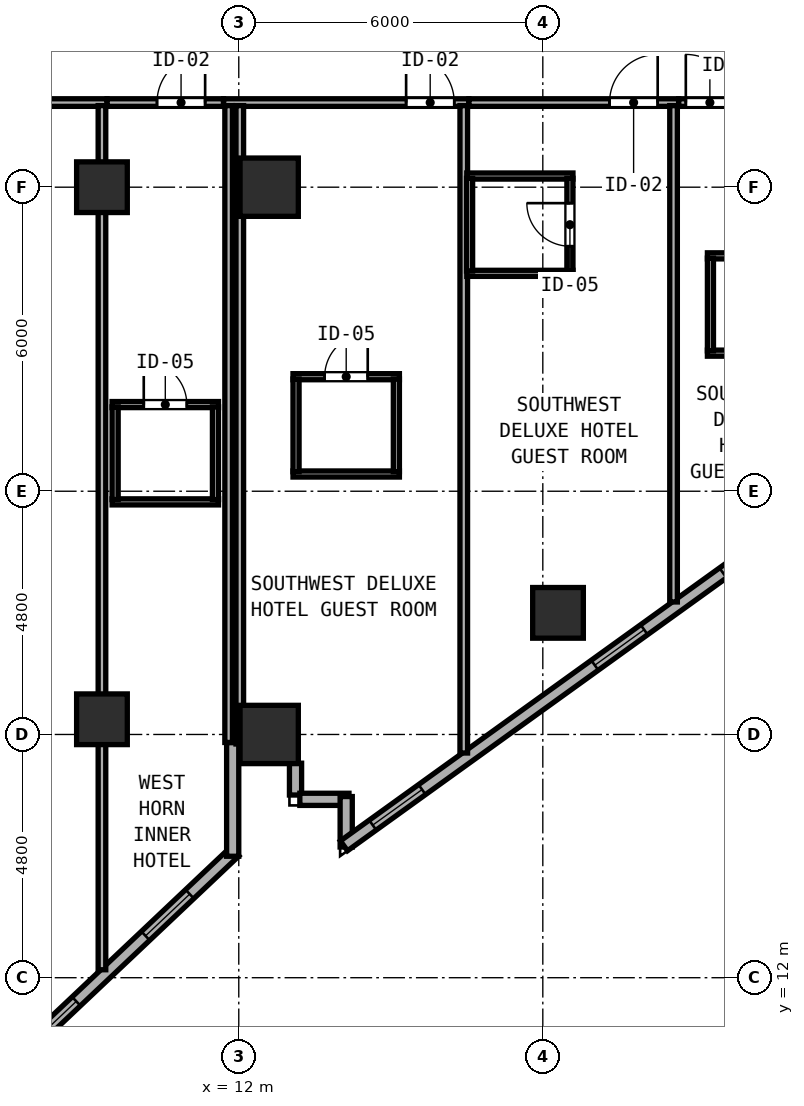
"""IFC4 building model, lengths in metres.
Left out: names, types, materials, properties, quantities, classifications, styles, units other than length and angle.
Written with IfcOpenShell. Run it as: python <this file> out.ifc"""

import sys

from ifc_helpers import new_model, si_unit, direction, frame, frame_2d, origin, origin_2d, place, context, subcontext, project, spatial, rectangle, hollow_rectangle, extrude, element, fill, save


model = new_model("IFC4")
c1 = context("Model", 3, precision=1e-05, world=origin(), true_north=direction((0.0, 1.0)))
c2 = subcontext(c1, "Body", "Model", "MODEL_VIEW")
j1 = project(units=[si_unit("LENGTHUNIT", "METRE"), si_unit("PLANEANGLEUNIT", "RADIAN")], contexts=[c1])
p1 = place(None, origin())
s1 = spatial("IfcSite", under=j1, at=p1, CompositionType="ELEMENT")
p2 = place(p1, origin())
s2 = spatial("IfcBuilding", under=s1, at=p2, CompositionType="ELEMENT")
p3 = place(p2, frame((0.0, 0.0, 59.0)))
s3 = spatial("IfcBuildingStorey", under=s2, at=p3, CompositionType="ELEMENT", Elevation=59.0)
for number, where, z_axis, x_axis in (
    (1, (12.6, 16.8, 0.0), (0.0, 0.0, 1.0), (1.0, 0.0, 0.0)),
    (2, (12.6, 27.6, 0.0), (0.0, 0.0, 1.0), (1.0, 0.0, 0.0)),
):
    element("IfcColumn", number, at=place(p3, frame(where, z_axis=z_axis, x_axis=x_axis)), inside=s3, PredefinedType="COLUMN", context=c2, shape_type="SweptSolid", body=[
        extrude(hollow_rectangle(XDim=1.15, YDim=1.15, WallThickness=0.042, at=origin_2d()), origin(), (0.0, 0.0, 1.0), 3.8),
    ])
for number, where, z_axis, x_axis in (
    (3, (18.3, 19.2, 0.0), (0.0, 0.0, 1.0), (1.0, 0.0, 0.0)),
    (4, (9.3, 17.1, 0.0), (0.0, 0.0, 1.0), (1.0, 0.0, 0.0)),
    (5, (9.3, 27.6, 0.0), (0.0, 0.0, 1.0), (1.0, 0.0, 0.0)),
):
    element("IfcColumn", number, at=place(p3, frame(where, z_axis=z_axis, x_axis=x_axis)), inside=s3, PredefinedType="COLUMN", context=c2, shape_type="SweptSolid", body=[
        extrude(hollow_rectangle(XDim=1.0, YDim=1.0, WallThickness=0.038, at=origin_2d()), origin(), (0.0, 0.0, 1.0), 3.8),
    ])
p4 = place(p3, frame((3.489, 6.518, 0.0), z_axis=(0.0, 0.0, 1.0), x_axis=(0.726640160789, 0.687018250652, 0.0)))
e6 = element("IfcWall", 6, at=p4, inside=s3, PredefinedType="SOLIDWALL", context=c2, shape_type="SweptSolid", body=[
    extrude(rectangle(XDim=11.603, YDim=0.24, at=frame_2d((5.801, 0.0))), origin(), (0.0, 0.0, 1.0), 3.6),
])
p5 = place(p4, frame((0.7, 0.0, 0.85)))
e7 = element("IfcOpeningElement", 7, at=p5, cuts=e6, PredefinedType="OPENING", context=c2, shape_type="SweptSolid", body=[
    extrude(rectangle(XDim=1.2, YDim=1.85, at=frame_2d((0.6, 0.925))), frame((0.0, 0.13, 0.0), z_axis=(0.0, -1.0, 0.0), x_axis=(1.0, 0.0, 0.0)), (0.0, 0.0, 1.0), 0.26),
])
p6 = place(p4, frame((6.1, 0.0, 0.85)))
e8 = element("IfcOpeningElement", 8, at=p6, cuts=e6, PredefinedType="OPENING", context=c2, shape_type="SweptSolid", body=[
    extrude(rectangle(XDim=1.2, YDim=1.85, at=frame_2d((0.6, 0.925))), frame((0.0, 0.13, 0.0), z_axis=(0.0, -1.0, 0.0), x_axis=(1.0, 0.0, 0.0)), (0.0, 0.0, 1.0), 0.26),
])
p7 = place(p4, frame((9.18, 0.0, 0.85)))
e9 = element("IfcOpeningElement", 9, at=p7, cuts=e6, PredefinedType="OPENING", context=c2, shape_type="SweptSolid", body=[
    extrude(rectangle(XDim=1.2, YDim=1.85, at=frame_2d((0.6, 0.925))), frame((0.0, 0.13, 0.0), z_axis=(0.0, -1.0, 0.0), x_axis=(1.0, 0.0, 0.0)), (0.0, 0.0, 1.0), 0.26),
])
p8 = place(p3, frame((11.88, 14.397, 0.0), z_axis=(0.0, 0.0, 1.0), x_axis=(0.0, 1.0, 0.0)))
e10 = element("IfcWall", 10, at=p8, inside=s3, PredefinedType="SOLIDWALL", context=c2, shape_type="SweptSolid", body=[
    extrude(rectangle(XDim=2.243, YDim=0.24, at=frame_2d((1.122, 0.0))), origin(), (0.0, 0.0, 1.0), 3.6),
])
p9 = place(p3, frame((13.12, 16.233, 0.0), z_axis=(0.0, 0.0, 1.0), x_axis=(0.0, -1.0, 0.0)))
e11 = element("IfcWall", 11, at=p9, inside=s3, PredefinedType="SOLIDWALL", context=c2, shape_type="SweptSolid", body=[
    extrude(rectangle(XDim=0.628, YDim=0.24, at=frame_2d((0.314, 0.0))), origin(), (0.0, 0.0, 1.0), 3.6),
])
p10 = place(p3, frame((13.205, 15.52, 0.0), z_axis=(0.0, 0.0, 1.0), x_axis=(1.0, 0.0, 0.0)))
e12 = element("IfcWall", 12, at=p10, inside=s3, PredefinedType="SOLIDWALL", context=c2, shape_type="SweptSolid", body=[
    extrude(rectangle(XDim=0.97, YDim=0.24, at=frame_2d((0.485, 0.0))), origin(), (0.0, 0.0, 1.0), 3.6),
])
p11 = place(p3, frame((14.12, 15.575, 0.0), z_axis=(0.0, 0.0, 1.0), x_axis=(0.0, -1.0, 0.0)))
e13 = element("IfcWall", 13, at=p11, inside=s3, PredefinedType="SOLIDWALL", context=c2, shape_type="SweptSolid", body=[
    extrude(rectangle(XDim=0.996, YDim=0.24, at=frame_2d((0.498, 0.0))), origin(), (0.0, 0.0, 1.0), 3.6),
])
p12 = place(p3, frame((14.075, 14.602, 0.0), z_axis=(0.0, 0.0, 1.0), x_axis=(0.811543176492, 0.58429245476, 0.0)))
e14 = element("IfcWall", 14, at=p12, inside=s3, PredefinedType="SOLIDWALL", context=c2, shape_type="SweptSolid", body=[
    extrude(rectangle(XDim=11.531, YDim=0.24, at=frame_2d((5.765, 0.0))), origin(), (0.0, 0.0, 1.0), 3.097),
])
p13 = place(p12, frame((0.7, 0.0, 0.85)))
e15 = element("IfcOpeningElement", 15, at=p13, cuts=e14, PredefinedType="OPENING", context=c2, shape_type="SweptSolid", body=[
    extrude(rectangle(XDim=1.2, YDim=1.85, at=frame_2d((0.6, 0.925))), frame((0.0, 0.13, 0.0), z_axis=(0.0, -1.0, 0.0), x_axis=(1.0, 0.0, 0.0)), (0.0, 0.0, 1.0), 0.26),
])
p14 = place(p12, frame((6.1, 0.0, 0.85)))
e16 = element("IfcOpeningElement", 16, at=p14, cuts=e14, PredefinedType="OPENING", context=c2, shape_type="SweptSolid", body=[
    extrude(rectangle(XDim=1.2, YDim=1.85, at=frame_2d((0.6, 0.925))), frame((0.0, 0.13, 0.0), z_axis=(0.0, -1.0, 0.0), x_axis=(1.0, 0.0, 0.0)), (0.0, 0.0, 1.0), 0.26),
])
p15 = place(p12, frame((9.218, 0.0, 0.85)))
e17 = element("IfcOpeningElement", 17, at=p15, cuts=e14, PredefinedType="OPENING", context=c2, shape_type="SweptSolid", body=[
    extrude(rectangle(XDim=1.2, YDim=1.85, at=frame_2d((0.6, 0.925))), frame((0.0, 0.13, 0.0), z_axis=(0.0, -1.0, 0.0), x_axis=(1.0, 0.0, 0.0)), (0.0, 0.0, 1.0), 0.26),
])
p16 = place(p3, frame((11.7, 29.27, 0.0), z_axis=(0.0, 0.0, 1.0), x_axis=(1.0, 0.0, 0.0)))
e18 = element("IfcWall", 18, at=p16, inside=s3, PredefinedType="PARTITIONING", context=c2, shape_type="SweptSolid", body=[
    extrude(rectangle(XDim=4.84, YDim=0.15, at=frame_2d((2.42, 0.0))), origin(), (0.0, 0.0, 1.0), 3.6),
])
p17 = place(p16, frame((4.552, 0.0, 0.0), z_axis=(0.0, 0.0, 1.0), x_axis=(-1.0, 0.0, 0.0)))
e19 = element("IfcOpeningElement", 19, at=p17, cuts=e18, PredefinedType="OPENING", context=c2, shape_type="SweptSolid", body=[
    extrude(rectangle(XDim=0.95, YDim=2.15, at=frame_2d((0.475, 1.075))), frame((0.0, 0.085, 0.0), z_axis=(0.0, -1.0, 0.0), x_axis=(1.0, 0.0, 0.0)), (0.0, 0.0, 1.0), 0.17),
])
p18 = place(p3, frame((11.8, 16.642, 0.0), z_axis=(0.0, 0.0, 1.0), x_axis=(0.0, 1.0, 0.0)))
e20 = element("IfcWall", 20, at=p18, inside=s3, PredefinedType="PARTITIONING", context=c2, shape_type="SweptSolid", body=[
    extrude(rectangle(XDim=12.568, YDim=0.15, at=frame_2d((6.284, 0.0))), origin(), (0.0, 0.0, 1.0), 3.6),
])
p19 = place(p3, frame((16.44, 16.434, 0.0), z_axis=(0.0, 0.0, 1.0), x_axis=(0.0, 1.0, 0.0)))
e21 = element("IfcWall", 21, at=p19, inside=s3, PredefinedType="PARTITIONING", context=c2, shape_type="SweptSolid", body=[
    extrude(rectangle(XDim=12.776, YDim=0.15, at=frame_2d((6.388, 0.0))), origin(), (0.0, 0.0, 1.0), 3.6),
])
p20 = place(p3, frame((13.07, 23.86, 0.0), z_axis=(0.0, 0.0, 1.0), x_axis=(1.0, 0.0, 0.0)))
e22 = element("IfcWall", 22, at=p20, inside=s3, PredefinedType="PARTITIONING", context=c2, shape_type="SweptSolid", body=[
    extrude(rectangle(XDim=2.1, YDim=0.12, at=frame_2d((1.05, 0.0))), origin(), (0.0, 0.0, 1.0), 3.6),
])
p21 = place(p20, frame((1.475, 0.0, 0.0), z_axis=(0.0, 0.0, 1.0), x_axis=(-1.0, 0.0, 0.0)))
e23 = element("IfcOpeningElement", 23, at=p21, cuts=e22, PredefinedType="OPENING", context=c2, shape_type="SweptSolid", body=[
    extrude(rectangle(XDim=0.85, YDim=2.1, at=frame_2d((0.425, 1.05))), frame((0.0, 0.07, 0.0), z_axis=(0.0, -1.0, 0.0), x_axis=(1.0, 0.0, 0.0)), (0.0, 0.0, 1.0), 0.14),
])
p22 = place(p3, frame((13.07, 21.94, 0.0), z_axis=(0.0, 0.0, 1.0), x_axis=(1.0, 0.0, 0.0)))
e24 = element("IfcWall", 24, at=p22, inside=s3, PredefinedType="PARTITIONING", context=c2, shape_type="SweptSolid", body=[
    extrude(rectangle(XDim=2.1, YDim=0.12, at=frame_2d((1.05, 0.0))), origin(), (0.0, 0.0, 1.0), 3.6),
])
for number, where, z_axis, x_axis in (
    (25, (13.13, 21.985, 0.0), (0.0, 0.0, 1.0), (0.0, 1.0, 0.0)),
    (26, (15.11, 21.985, 0.0), (0.0, 0.0, 1.0), (0.0, 1.0, 0.0)),
):
    element("IfcWall", number, at=place(p3, frame(where, z_axis=z_axis, x_axis=x_axis)), inside=s3, PredefinedType="PARTITIONING", context=c2, shape_type="SweptSolid", body=[
        extrude(rectangle(XDim=1.83, YDim=0.12, at=frame_2d((0.915, 0.0))), origin(), (0.0, 0.0, 1.0), 3.6),
    ])
p23 = place(p3, frame((16.542, 29.27, 0.0), z_axis=(0.0, 0.0, 1.0), x_axis=(1.0, 0.0, 0.0)))
e27 = element("IfcWall", 27, at=p23, inside=s3, PredefinedType="PARTITIONING", context=c2, shape_type="SweptSolid", body=[
    extrude(rectangle(XDim=4.138, YDim=0.15, at=frame_2d((2.069, 0.0))), origin(), (0.0, 0.0, 1.0), 3.6),
])
p24 = place(p23, frame((3.725, 0.0, 0.0), z_axis=(0.0, 0.0, 1.0), x_axis=(-1.0, 0.0, 0.0)))
e28 = element("IfcOpeningElement", 28, at=p24, cuts=e27, PredefinedType="OPENING", context=c2, shape_type="SweptSolid", body=[
    extrude(rectangle(XDim=0.95, YDim=2.15, at=frame_2d((0.475, 1.075))), frame((0.0, 0.085, 0.0), z_axis=(0.0, -1.0, 0.0), x_axis=(1.0, 0.0, 0.0)), (0.0, 0.0, 1.0), 0.17),
])
p25 = place(p3, frame((20.58, 19.415, 0.0), z_axis=(0.0, 0.0, 1.0), x_axis=(0.0, 1.0, 0.0)))
e29 = element("IfcWall", 29, at=p25, inside=s3, PredefinedType="PARTITIONING", context=c2, shape_type="SweptSolid", body=[
    extrude(rectangle(XDim=9.795, YDim=0.15, at=frame_2d((4.897, 0.0))), origin(), (0.0, 0.0, 1.0), 3.6),
])
p26 = place(p3, frame((16.5, 27.82, 0.0), z_axis=(0.0, 0.0, 1.0), x_axis=(1.0, 0.0, 0.0)))
e30 = element("IfcWall", 30, at=p26, inside=s3, PredefinedType="PARTITIONING", context=c2, shape_type="SweptSolid", body=[
    extrude(rectangle(XDim=2.095, YDim=0.12, at=frame_2d((1.047, 0.0))), origin(), (0.0, 0.0, 1.0), 3.097),
])
p27 = place(p3, frame((16.5, 25.9, 0.0), z_axis=(0.0, 0.0, 1.0), x_axis=(1.0, 0.0, 0.0)))
e31 = element("IfcWall", 31, at=p27, inside=s3, PredefinedType="PARTITIONING", context=c2, shape_type="SweptSolid", body=[
    extrude(rectangle(XDim=2.095, YDim=0.12, at=frame_2d((1.047, 0.0))), origin(), (0.0, 0.0, 1.0), 3.6),
])
p28 = place(p3, frame((16.555, 25.945, 0.0), z_axis=(0.0, 0.0, 1.0), x_axis=(0.0, 1.0, 0.0)))
e32 = element("IfcWall", 32, at=p28, inside=s3, PredefinedType="PARTITIONING", context=c2, shape_type="SweptSolid", body=[
    extrude(rectangle(XDim=1.83, YDim=0.12, at=frame_2d((0.915, 0.0))), origin(), (0.0, 0.0, 1.0), 3.6),
])
p29 = place(p3, frame((18.535, 25.945, 0.0), z_axis=(0.0, 0.0, 1.0), x_axis=(0.0, 1.0, 0.0)))
e33 = element("IfcWall", 33, at=p29, inside=s3, PredefinedType="PARTITIONING", context=c2, shape_type="SweptSolid", body=[
    extrude(rectangle(XDim=1.83, YDim=0.12, at=frame_2d((0.915, 0.0))), origin(), (0.0, 0.0, 1.0), 3.6),
])
p30 = place(p29, frame((0.49, 0.0, 0.0)))
e34 = element("IfcOpeningElement", 34, at=p30, cuts=e33, PredefinedType="OPENING", context=c2, shape_type="SweptSolid", body=[
    extrude(rectangle(XDim=0.85, YDim=2.1, at=frame_2d((0.425, 1.05))), frame((0.0, 0.07, 0.0), z_axis=(0.0, -1.0, 0.0), x_axis=(1.0, 0.0, 0.0)), (0.0, 0.0, 1.0), 0.14),
])
p31 = place(p3, frame((20.682, 29.27, 0.0), z_axis=(0.0, 0.0, 1.0), x_axis=(1.0, 0.0, 0.0)))
e35 = element("IfcWall", 35, at=p31, inside=s3, PredefinedType="PARTITIONING", context=c2, shape_type="SweptSolid", body=[
    extrude(rectangle(XDim=3.236, YDim=0.15, at=frame_2d((1.618, 0.0))), origin(), (0.0, 0.0, 1.0), 3.6),
])
p32 = place(p31, frame((1.09, 0.0, 0.0), z_axis=(0.0, 0.0, 1.0), x_axis=(-1.0, 0.0, 0.0)))
e36 = element("IfcOpeningElement", 36, at=p32, cuts=e35, PredefinedType="OPENING", context=c2, shape_type="SweptSolid", body=[
    extrude(rectangle(XDim=0.95, YDim=2.15, at=frame_2d((0.475, 1.075))), frame((0.0, 0.085, 0.0), z_axis=(0.0, -1.0, 0.0), x_axis=(1.0, 0.0, 0.0)), (0.0, 0.0, 1.0), 0.17),
])
p33 = place(p3, frame((21.248, 26.245, 0.0), z_axis=(0.0, 0.0, 1.0), x_axis=(1.0, 0.0, 0.0)))
e37 = element("IfcWall", 37, at=p33, inside=s3, PredefinedType="PARTITIONING", context=c2, shape_type="SweptSolid", body=[
    extrude(rectangle(XDim=2.1, YDim=0.12, at=frame_2d((1.05, 0.0))), origin(), (0.0, 0.0, 1.0), 3.6),
])
p34 = place(p33, frame((1.475, 0.0, 0.0), z_axis=(0.0, 0.0, 1.0), x_axis=(-1.0, 0.0, 0.0)))
e38 = element("IfcOpeningElement", 38, at=p34, cuts=e37, PredefinedType="OPENING", context=c2, shape_type="SweptSolid", body=[
    extrude(rectangle(XDim=0.85, YDim=2.1, at=frame_2d((0.425, 1.05))), frame((0.0, 0.07, 0.0), z_axis=(0.0, -1.0, 0.0), x_axis=(1.0, 0.0, 0.0)), (0.0, 0.0, 1.0), 0.14),
])
p35 = place(p3, frame((21.248, 24.325, 0.0), z_axis=(0.0, 0.0, 1.0), x_axis=(1.0, 0.0, 0.0)))
e39 = element("IfcWall", 39, at=p35, inside=s3, PredefinedType="PARTITIONING", context=c2, shape_type="SweptSolid", body=[
    extrude(rectangle(XDim=2.1, YDim=0.12, at=frame_2d((1.05, 0.0))), origin(), (0.0, 0.0, 1.0), 3.6),
])
p36 = place(p3, frame((21.308, 24.37, 0.0), z_axis=(0.0, 0.0, 1.0), x_axis=(0.0, 1.0, 0.0)))
e40 = element("IfcWall", 40, at=p36, inside=s3, PredefinedType="PARTITIONING", context=c2, shape_type="SweptSolid", body=[
    extrude(rectangle(XDim=1.83, YDim=0.12, at=frame_2d((0.915, 0.0))), origin(), (0.0, 0.0, 1.0), 3.6),
])
p37 = place(p3, frame((2.156, 29.27, 0.0), z_axis=(0.0, 0.0, 1.0), x_axis=(1.0, 0.0, 0.0)))
e41 = element("IfcWall", 41, at=p37, inside=s3, PredefinedType="PARTITIONING", context=c2, shape_type="SweptSolid", body=[
    extrude(rectangle(XDim=7.244, YDim=0.15, at=frame_2d((3.622, 0.0))), origin(), (0.0, 0.0, 1.0), 3.6),
])
p38 = place(p37, frame((5.947, 0.0, 0.0), z_axis=(0.0, 0.0, 1.0), x_axis=(-1.0, 0.0, 0.0)))
e42 = element("IfcOpeningElement", 42, at=p38, cuts=e41, PredefinedType="OPENING", context=c2, shape_type="SweptSolid", body=[
    extrude(rectangle(XDim=0.95, YDim=2.18, at=frame_2d((0.475, 1.09))), frame((0.0, 0.085, 0.0), z_axis=(0.0, -1.0, 0.0), x_axis=(1.0, 0.0, 0.0)), (0.0, 0.0, 1.0), 0.17),
])
p39 = place(p3, frame((9.3, 12.157, 0.0), z_axis=(0.0, 0.0, 1.0), x_axis=(0.0, 1.0, 0.0)))
e43 = element("IfcWall", 43, at=p39, inside=s3, PredefinedType="PARTITIONING", context=c2, shape_type="SweptSolid", body=[
    extrude(rectangle(XDim=17.053, YDim=0.15, at=frame_2d((8.526, 0.0))), origin(), (0.0, 0.0, 1.0), 3.6),
])
p40 = place(p3, frame((9.402, 29.27, 0.0), z_axis=(0.0, 0.0, 1.0), x_axis=(1.0, 0.0, 0.0)))
e44 = element("IfcWall", 44, at=p40, inside=s3, PredefinedType="PARTITIONING", context=c2, shape_type="SweptSolid", body=[
    extrude(rectangle(XDim=2.296, YDim=0.15, at=frame_2d((1.148, 0.0))), origin(), (0.0, 0.0, 1.0), 3.6),
])
p41 = place(p40, frame((1.934, 0.0, 0.0), z_axis=(0.0, 0.0, 1.0), x_axis=(-1.0, 0.0, 0.0)))
e45 = element("IfcOpeningElement", 45, at=p41, cuts=e44, PredefinedType="OPENING", context=c2, shape_type="SweptSolid", body=[
    extrude(rectangle(XDim=0.95, YDim=2.15, at=frame_2d((0.475, 1.075))), frame((0.0, 0.085, 0.0), z_axis=(0.0, -1.0, 0.0), x_axis=(1.0, 0.0, 0.0)), (0.0, 0.0, 1.0), 0.17),
])
p42 = place(p3, frame((12.02, 16.612, 0.0), z_axis=(0.0, 0.0, 1.0), x_axis=(0.0, 1.0, 0.0)))
e46 = element("IfcWall", 46, at=p42, inside=s3, PredefinedType="PARTITIONING", context=c2, shape_type="SweptSolid", body=[
    extrude(rectangle(XDim=12.598, YDim=0.15, at=frame_2d((6.299, 0.0))), origin(), (0.0, 0.0, 1.0), 3.6),
])
p43 = place(p3, frame((9.5, 23.31, 0.0), z_axis=(0.0, 0.0, 1.0), x_axis=(1.0, 0.0, 0.0)))
e47 = element("IfcWall", 47, at=p43, inside=s3, PredefinedType="PARTITIONING", context=c2, shape_type="SweptSolid", body=[
    extrude(rectangle(XDim=2.1, YDim=0.12, at=frame_2d((1.05, 0.0))), origin(), (0.0, 0.0, 1.0), 3.6),
])
p44 = place(p43, frame((1.475, 0.0, 0.0), z_axis=(0.0, 0.0, 1.0), x_axis=(-1.0, 0.0, 0.0)))
e48 = element("IfcOpeningElement", 48, at=p44, cuts=e47, PredefinedType="OPENING", context=c2, shape_type="SweptSolid", body=[
    extrude(rectangle(XDim=0.85, YDim=2.1, at=frame_2d((0.425, 1.05))), frame((0.0, 0.07, 0.0), z_axis=(0.0, -1.0, 0.0), x_axis=(1.0, 0.0, 0.0)), (0.0, 0.0, 1.0), 0.14),
])
p45 = place(p3, frame((9.5, 21.39, 0.0), z_axis=(0.0, 0.0, 1.0), x_axis=(1.0, 0.0, 0.0)))
e49 = element("IfcWall", 49, at=p45, inside=s3, PredefinedType="PARTITIONING", context=c2, shape_type="SweptSolid", body=[
    extrude(rectangle(XDim=2.1, YDim=0.12, at=frame_2d((1.05, 0.0))), origin(), (0.0, 0.0, 1.0), 3.6),
])
for number, where, z_axis, x_axis in (
    (50, (9.56, 21.435, 0.0), (0.0, 0.0, 1.0), (0.0, 1.0, 0.0)),
    (51, (11.54, 21.435, 0.0), (0.0, 0.0, 1.0), (0.0, 1.0, 0.0)),
):
    element("IfcWall", number, at=place(p3, frame(where, z_axis=z_axis, x_axis=x_axis)), inside=s3, PredefinedType="PARTITIONING", context=c2, shape_type="SweptSolid", body=[
        extrude(rectangle(XDim=1.83, YDim=0.12, at=frame_2d((0.915, 0.0))), origin(), (0.0, 0.0, 1.0), 3.6),
    ])
p46 = place(p6, origin())
e52 = element("IfcWindow", 52, at=p46, inside=s3, PartitioningType="SINGLE_PANEL", PredefinedType="WINDOW", context=c2, shape_type="SweptSolid", body=[
    extrude(rectangle(XDim=1.2, YDim=1.85, at=frame_2d((0.6, 0.925))), frame((0.0, 0.03, 0.0), z_axis=(0.0, -1.0, 0.0), x_axis=(1.0, 0.0, 0.0)), (0.0, 0.0, 1.0), 0.06),
])
fill(e8, e52)
p47 = place(p13, origin())
e53 = element("IfcWindow", 53, at=p47, inside=s3, PartitioningType="SINGLE_PANEL", PredefinedType="WINDOW", context=c2, shape_type="SweptSolid", body=[
    extrude(rectangle(XDim=1.2, YDim=1.85, at=frame_2d((0.6, 0.925))), frame((0.0, 0.03, 0.0), z_axis=(0.0, -1.0, 0.0), x_axis=(1.0, 0.0, 0.0)), (0.0, 0.0, 1.0), 0.06),
])
fill(e15, e53)
p48 = place(p14, origin())
e54 = element("IfcWindow", 54, at=p48, inside=s3, PartitioningType="SINGLE_PANEL", PredefinedType="WINDOW", context=c2, shape_type="SweptSolid", body=[
    extrude(rectangle(XDim=1.2, YDim=1.85, at=frame_2d((0.6, 0.925))), frame((0.0, 0.03, 0.0), z_axis=(0.0, -1.0, 0.0), x_axis=(1.0, 0.0, 0.0)), (0.0, 0.0, 1.0), 0.06),
])
fill(e16, e54)
p49 = place(p17, origin())
e55 = element("IfcDoor", 55, at=p49, inside=s3, OperationType="SINGLE_SWING_RIGHT", PredefinedType="DOOR", context=c2, shape_type="SweptSolid", body=[
    extrude(rectangle(XDim=0.95, YDim=2.15, at=frame_2d((0.475, 1.075))), frame((0.0, 0.025, 0.0), z_axis=(0.0, -1.0, 0.0), x_axis=(1.0, 0.0, 0.0)), (0.0, 0.0, 1.0), 0.05),
])
fill(e19, e55)
p50 = place(p21, origin())
e56 = element("IfcDoor", 56, at=p50, inside=s3, OperationType="SINGLE_SWING_LEFT", PredefinedType="DOOR", context=c2, shape_type="SweptSolid", body=[
    extrude(rectangle(XDim=0.85, YDim=2.1, at=frame_2d((0.425, 1.05))), frame((0.0, 0.025, 0.0), z_axis=(0.0, -1.0, 0.0), x_axis=(1.0, 0.0, 0.0)), (0.0, 0.0, 1.0), 0.05),
])
fill(e23, e56)
p51 = place(p24, origin())
e57 = element("IfcDoor", 57, at=p51, inside=s3, OperationType="SINGLE_SWING_LEFT", PredefinedType="DOOR", context=c2, shape_type="SweptSolid", body=[
    extrude(rectangle(XDim=0.95, YDim=2.15, at=frame_2d((0.475, 1.075))), frame((0.0, 0.025, 0.0), z_axis=(0.0, -1.0, 0.0), x_axis=(1.0, 0.0, 0.0)), (0.0, 0.0, 1.0), 0.05),
])
fill(e28, e57)
p52 = place(p30, origin())
e58 = element("IfcDoor", 58, at=p52, inside=s3, OperationType="SINGLE_SWING_RIGHT", PredefinedType="DOOR", context=c2, shape_type="SweptSolid", body=[
    extrude(rectangle(XDim=0.85, YDim=2.1, at=frame_2d((0.425, 1.05))), frame((0.0, 0.025, 0.0), z_axis=(0.0, -1.0, 0.0), x_axis=(1.0, 0.0, 0.0)), (0.0, 0.0, 1.0), 0.05),
])
fill(e34, e58)
p53 = place(p32, origin())
e59 = element("IfcDoor", 59, at=p53, inside=s3, OperationType="SINGLE_SWING_RIGHT", PredefinedType="DOOR", context=c2, shape_type="SweptSolid", body=[
    extrude(rectangle(XDim=0.95, YDim=2.15, at=frame_2d((0.475, 1.075))), frame((0.0, 0.025, 0.0), z_axis=(0.0, -1.0, 0.0), x_axis=(1.0, 0.0, 0.0)), (0.0, 0.0, 1.0), 0.05),
])
fill(e36, e59)
p54 = place(p41, origin())
e60 = element("IfcDoor", 60, at=p54, inside=s3, OperationType="SINGLE_SWING_LEFT", PredefinedType="DOOR", context=c2, shape_type="SweptSolid", body=[
    extrude(rectangle(XDim=0.95, YDim=2.15, at=frame_2d((0.475, 1.075))), frame((0.0, 0.025, 0.0), z_axis=(0.0, -1.0, 0.0), x_axis=(1.0, 0.0, 0.0)), (0.0, 0.0, 1.0), 0.05),
])
fill(e45, e60)
p55 = place(p44, origin())
e61 = element("IfcDoor", 61, at=p55, inside=s3, OperationType="SINGLE_SWING_RIGHT", PredefinedType="DOOR", context=c2, shape_type="SweptSolid", body=[
    extrude(rectangle(XDim=0.85, YDim=2.1, at=frame_2d((0.425, 1.05))), frame((0.0, 0.025, 0.0), z_axis=(0.0, -1.0, 0.0), x_axis=(1.0, 0.0, 0.0)), (0.0, 0.0, 1.0), 0.05),
])
fill(e48, e61)
p56 = place(p15, origin())
e62 = element("IfcWindow", 62, at=p56, inside=s3, PartitioningType="SINGLE_PANEL", PredefinedType="WINDOW", context=c2, shape_type="SweptSolid", body=[
    extrude(rectangle(XDim=1.2, YDim=1.85, at=frame_2d((0.6, 0.925))), frame((0.0, 0.03, 0.0), z_axis=(0.0, -1.0, 0.0), x_axis=(1.0, 0.0, 0.0)), (0.0, 0.0, 1.0), 0.06),
])
fill(e17, e62)
p57 = place(p7, origin())
e63 = element("IfcWindow", 63, at=p57, inside=s3, PartitioningType="SINGLE_PANEL", PredefinedType="WINDOW", context=c2, shape_type="SweptSolid", body=[
    extrude(rectangle(XDim=1.2, YDim=1.85, at=frame_2d((0.6, 0.925))), frame((0.0, 0.03, 0.0), z_axis=(0.0, -1.0, 0.0), x_axis=(1.0, 0.0, 0.0)), (0.0, 0.0, 1.0), 0.06),
])
fill(e9, e63)
save(model, sys.argv[1])
